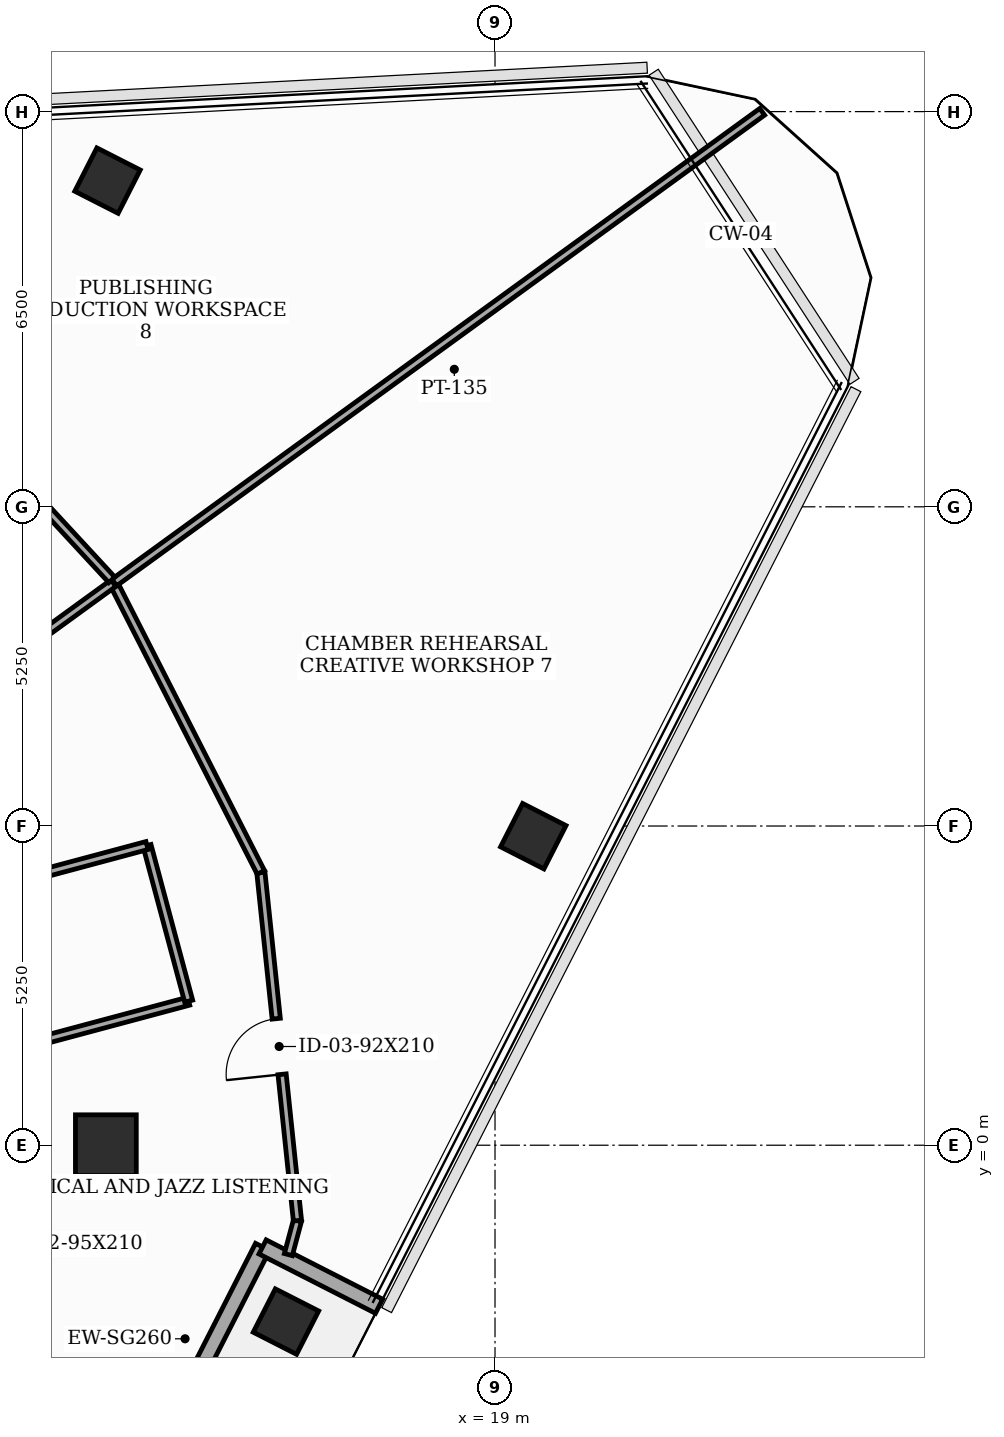
"""IFC4 building model, lengths in metres.
Left out: names, types, materials, properties, quantities, classifications, styles, units other than length and angle.
Written with IfcOpenShell. Run it as: python <this file> out.ifc"""

import sys

from ifc_helpers import new_model, si_unit, direction, frame, frame_2d, origin, origin_2d, place, context, subcontext, project, spatial, rectangle, extrude, element, fill, save


model = new_model("IFC4")
c1 = context("Model", 3, precision=1e-05, world=origin(), true_north=direction((0.0, 1.0)))
c2 = subcontext(c1, "Body", "Model", "MODEL_VIEW")
j1 = project(units=[si_unit("LENGTHUNIT", "METRE"), si_unit("PLANEANGLEUNIT", "RADIAN")], contexts=[c1])
p1 = place(None, origin())
s1 = spatial("IfcSite", under=j1, at=p1, CompositionType="ELEMENT")
p2 = place(p1, origin())
s2 = spatial("IfcBuilding", under=s1, at=p2, CompositionType="ELEMENT")
p3 = place(p2, frame((0.0, 0.0, 252.2)))
s3 = spatial("IfcBuildingStorey", under=s2, at=p3, CompositionType="ELEMENT", Elevation=252.2)
p4 = place(p3, frame((12.6, 0.0, 0.0), z_axis=(0.0, 0.0, 1.0), x_axis=(1.0, 0.0, 0.0)))
e1 = element("IfcColumn", 1, at=p4, inside=s3, PredefinedType="COLUMN", context=c2, shape_type="SweptSolid", body=[
    extrude(rectangle(XDim=1.0, YDim=1.0, at=origin_2d()), origin(), (0.0, 0.0, 1.0), 3.7),
])
for number, where, z_axis, x_axis in (
    (2, (15.562, -2.901, 0.0), (0.0, 0.0, 1.0), (0.454, 0.891, 0.0)),
    (3, (19.629, 5.082, 0.0), (0.0, 0.0, 1.0), (0.454, 0.891, 0.0)),
    (4, (12.627, 15.865, 0.0), (0.0, 0.0, 1.0), (0.454, 0.891, 0.0)),
):
    element("IfcColumn", number, at=place(p3, frame(where, z_axis=z_axis, x_axis=x_axis)), inside=s3, PredefinedType="COLUMN", context=c2, shape_type="SweptSolid", body=[
        extrude(rectangle(XDim=0.8, YDim=0.8, at=origin_2d()), origin(), (0.0, 0.0, 1.0), 3.7),
    ])
p5 = place(p3, frame((10.274, -11.296, 0.0), z_axis=(0.0, 0.0, 1.0), x_axis=(0.453991476178, 0.891006026667, 0.0)))
e5 = element("IfcWall", 5, at=p5, inside=s3, PredefinedType="SOLIDWALL", context=c2, shape_type="SweptSolid", body=[
    extrude(rectangle(XDim=10.8, YDim=0.26, at=frame_2d((5.4, 0.0))), origin(), (0.0, 0.0, 1.0), 3.5),
])
p6 = place(p5, frame((3.2, 0.0, 0.0)))
e6 = element("IfcOpeningElement", 6, at=p6, cuts=e5, PredefinedType="OPENING", context=c2, shape_type="SweptSolid", body=[
    extrude(rectangle(XDim=1.6, YDim=2.08, at=frame_2d((0.8, 1.04))), frame((0.0, 0.14, 0.0), z_axis=(0.0, -1.0, 0.0), x_axis=(1.0, 0.0, 0.0)), (0.0, 0.0, 1.0), 0.28),
])
p7 = place(p5, frame((5.65, 0.0, 0.85)))
e7 = element("IfcOpeningElement", 7, at=p7, cuts=e5, PredefinedType="OPENING", context=c2, shape_type="SweptSolid", body=[
    extrude(rectangle(XDim=1.3, YDim=1.25, at=frame_2d((0.65, 0.625))), frame((0.0, 0.14, 0.0), z_axis=(0.0, -1.0, 0.0), x_axis=(1.0, 0.0, 0.0)), (0.0, 0.0, 1.0), 0.28),
])
p8 = place(p3, frame((15.177, -1.673, 0.0), z_axis=(0.0, 0.0, 1.0), x_axis=(0.890994427822, -0.454014239413, 0.0)))
e8 = element("IfcWall", 8, at=p8, inside=s3, PredefinedType="SOLIDWALL", context=c2, shape_type="SweptSolid", body=[
    extrude(rectangle(XDim=2.15, YDim=0.26, at=frame_2d((1.075, 0.0))), origin(), (0.0, 0.0, 1.0), 3.5),
])
p9 = place(p3, frame((10.65, 1.482, 0.0), z_axis=(0.0, 0.0, 1.0), x_axis=(0.965961397105, 0.2586862565, 0.0)))
e9 = element("IfcWall", 9, at=p9, inside=s3, PredefinedType="PARTITIONING", context=c2, shape_type="SweptSolid", body=[
    extrude(rectangle(XDim=3.429, YDim=0.135, at=frame_2d((1.714, 0.0))), origin(), (0.0, 0.0, 1.0), 2.885),
])
p10 = place(p3, frame((13.962, 2.369, 0.0), z_axis=(0.0, 0.0, 1.0), x_axis=(-0.258413725385, 0.966034340245, 0.0)))
e10 = element("IfcWall", 10, at=p10, inside=s3, PredefinedType="PARTITIONING", context=c2, shape_type="SweptSolid", body=[
    extrude(rectangle(XDim=2.65, YDim=0.135, at=frame_2d((1.325, 0.0))), origin(), (0.0, 0.0, 1.0), 3.5),
])
p11 = place(p3, frame((13.277, 4.929, 0.0), z_axis=(0.0, 0.0, 1.0), x_axis=(-0.965934830229, -0.258785439601, 0.0)))
e11 = element("IfcWall", 11, at=p11, inside=s3, PredefinedType="PARTITIONING", context=c2, shape_type="SweptSolid", body=[
    extrude(rectangle(XDim=2.72, YDim=0.135, at=frame_2d((1.36, 0.0))), origin(), (0.0, 0.0, 1.0), 2.885),
])
p12 = place(p3, frame((15.601, -1.799, 0.0), z_axis=(0.0, 0.0, 1.0), x_axis=(0.258686866039, 0.96596123387, 0.0)))
e12 = element("IfcWall", 12, at=p12, inside=s3, PredefinedType="PARTITIONING", context=c2, shape_type="SweptSolid", body=[
    extrude(rectangle(XDim=0.579, YDim=0.135, at=frame_2d((0.289, 0.0))), origin(), (0.0, 0.0, 1.0), 3.5),
])
p13 = place(p3, frame((15.751, -1.24, 0.0), z_axis=(0.0, 0.0, 1.0), x_axis=(-0.104547955553, 0.994519846453, 0.0)))
e13 = element("IfcWall", 13, at=p13, inside=s3, PredefinedType="PARTITIONING", context=c2, shape_type="SweptSolid", body=[
    extrude(rectangle(XDim=5.759, YDim=0.135, at=frame_2d((2.879, 0.0))), origin(), (0.0, 0.0, 1.0), 3.035),
])
p14 = place(p13, frame((2.419, 0.0, 0.0)))
e14 = element("IfcOpeningElement", 14, at=p14, cuts=e13, PredefinedType="OPENING", context=c2, shape_type="SweptSolid", body=[
    extrude(rectangle(XDim=0.92, YDim=2.1, at=frame_2d((0.46, 1.05))), frame((0.0, 0.077, 0.0), z_axis=(0.0, -1.0, 0.0), x_axis=(1.0, 0.0, 0.0)), (0.0, 0.0, 1.0), 0.155),
])
p15 = place(p3, frame((15.149, 4.487, 0.0), z_axis=(0.0, 0.0, 1.0), x_axis=(-0.453912768225, 0.891046126102, 0.0)))
e15 = element("IfcWall", 15, at=p15, inside=s3, PredefinedType="PARTITIONING", context=c2, shape_type="SweptSolid", body=[
    extrude(rectangle(XDim=5.34, YDim=0.135, at=frame_2d((2.67, 0.0))), origin(), (0.0, 0.0, 1.0), 3.185),
])
p16 = place(p3, frame((12.725, 9.245, 0.0), z_axis=(0.0, 0.0, 1.0), x_axis=(-0.809135191367, -0.587622533683, 0.0)))
e16 = element("IfcWall", 16, at=p16, inside=s3, PredefinedType="PARTITIONING", context=c2, shape_type="SweptSolid", body=[
    extrude(rectangle(XDim=2.565, YDim=0.135, at=frame_2d((1.282, 0.0))), origin(), (0.0, 0.0, 1.0), 3.185),
])
p17 = place(p3, frame((23.394, 16.997, 0.0), z_axis=(0.0, 0.0, 1.0), x_axis=(-0.80901413128, -0.587789192985, 0.0)))
e17 = element("IfcWall", 17, at=p17, inside=s3, PredefinedType="PARTITIONING", context=c2, shape_type="SweptSolid", body=[
    extrude(rectangle(XDim=13.171, YDim=0.135, at=frame_2d((6.586, 0.0))), origin(), (0.0, 0.0, 1.0), 3.035),
])
p18 = place(p3, frame((9.943, 12.279, 0.0), z_axis=(0.0, 0.0, 1.0), x_axis=(0.678829604912, -0.734295831049, 0.0)))
e18 = element("IfcWall", 18, at=p18, inside=s3, PredefinedType="PARTITIONING", context=c2, shape_type="SweptSolid", body=[
    extrude(rectangle(XDim=4.058, YDim=0.135, at=frame_2d((2.029, 0.0))), origin(), (0.0, 0.0, 1.0), 3.185),
])
p19 = place(p14, origin())
e19 = element("IfcDoor", 19, at=p19, inside=s3, OperationType="SINGLE_SWING_LEFT", PredefinedType="DOOR", context=c2, shape_type="SweptSolid", body=[
    extrude(rectangle(XDim=0.92, YDim=2.1, at=frame_2d((0.46, 1.05))), frame((0.0, 0.025, 0.0), z_axis=(0.0, -1.0, 0.0), x_axis=(1.0, 0.0, 0.0)), (0.0, 0.0, 1.0), 0.05),
])
fill(e14, e19)
save(model, sys.argv[1])
